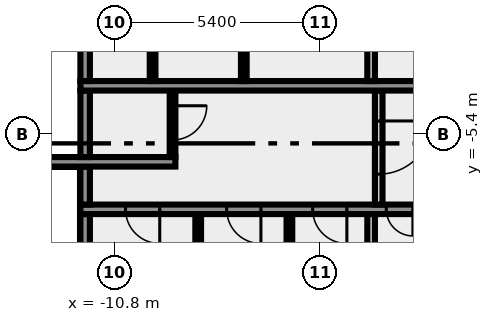
"""IFC4 building model, lengths in metres.
Left out: names, types, materials, properties, quantities, classifications, styles, units other than length and angle.
Written with IfcOpenShell. Run it as: python <this file> out.ifc"""

import sys

from ifc_helpers import new_model, si_unit, direction, frame, frame_2d, origin, place, context, subcontext, project, spatial, rectangle, extrude, element, fill, save


model = new_model("IFC4")
c1 = context("Model", 3, precision=1e-05, world=origin(), true_north=direction((0.0, 1.0)))
c2 = subcontext(c1, "Body", "Model", "MODEL_VIEW")
j1 = project(units=[si_unit("LENGTHUNIT", "METRE"), si_unit("PLANEANGLEUNIT", "RADIAN")], contexts=[c1])
p1 = place(None, origin())
s1 = spatial("IfcSite", under=j1, at=p1, CompositionType="ELEMENT")
p2 = place(p1, origin())
s2 = spatial("IfcBuilding", under=s1, at=p2, CompositionType="ELEMENT")
p3 = place(p2, frame((0.0, 0.0, 206.0)))
s3 = spatial("IfcBuildingStorey", under=s2, at=p3, CompositionType="ELEMENT", Elevation=206.0)
p4 = place(p3, frame((-11.575, -10.5, 0.0), z_axis=(0.0, 0.0, 1.0), x_axis=(0.0, 1.0, 0.0)))
e1 = element("IfcWall", 1, at=p4, inside=s3, PredefinedType="SHEAR", context=c2, shape_type="SweptSolid", body=[
    extrude(rectangle(XDim=3.0, YDim=0.25, at=frame_2d((1.5, 0.0))), origin(), (0.0, 0.0, 1.0), 3.65),
])
for number, where, z_axis, x_axis in (
    (2, (-8.6, -10.5, 0.0), (0.0, 0.0, 1.0), (0.0, 1.0, 0.0)),
    (3, (-6.2, -10.5, 0.0), (0.0, 0.0, 1.0), (0.0, 1.0, 0.0)),
):
    element("IfcWall", number, at=place(p3, frame(where, z_axis=z_axis, x_axis=x_axis)), inside=s3, PredefinedType="PARTITIONING", context=c2, shape_type="SweptSolid", body=[
        extrude(rectangle(XDim=3.0, YDim=0.15, at=frame_2d((1.5, 0.0))), origin(), (0.0, 0.0, 1.0), 3.65),
    ])
p5 = place(p3, frame((-4.05, -10.5, 0.0), z_axis=(0.0, 0.0, 1.0), x_axis=(0.0, 1.0, 0.0)))
e4 = element("IfcWall", 4, at=p5, inside=s3, PredefinedType="SOLIDWALL", context=c2, shape_type="SweptSolid", body=[
    extrude(rectangle(XDim=3.0, YDim=0.2, at=frame_2d((1.5, 0.0))), origin(), (0.0, 0.0, 1.0), 3.65),
])
p6 = place(p3, frame((11.7, -7.375, 0.0), z_axis=(0.0, 0.0, 1.0), x_axis=(-1.0, 0.0, 0.0)))
e5 = element("IfcWall", 5, at=p6, inside=s3, PredefinedType="SHEAR", context=c2, shape_type="SweptSolid", body=[
    extrude(rectangle(XDim=23.4, YDim=0.25, at=frame_2d((11.7, 0.0))), origin(), (0.0, 0.0, 1.0), 3.65),
])
p7 = place(p6, frame((21.312, 0.0, 0.0)))
e6 = element("IfcOpeningElement", 6, at=p7, cuts=e5, PredefinedType="OPENING", context=c2, shape_type="SweptSolid", body=[
    extrude(rectangle(XDim=0.9, YDim=2.1, at=frame_2d((0.45, 1.05))), frame((0.0, 0.135, 0.0), z_axis=(0.0, -1.0, 0.0), x_axis=(1.0, 0.0, 0.0)), (0.0, 0.0, 1.0), 0.27),
])
p8 = place(p6, frame((18.65, 0.0, 0.0)))
e7 = element("IfcOpeningElement", 7, at=p8, cuts=e5, PredefinedType="OPENING", context=c2, shape_type="SweptSolid", body=[
    extrude(rectangle(XDim=0.9, YDim=2.1, at=frame_2d((0.45, 1.05))), frame((0.0, 0.135, 0.0), z_axis=(0.0, -1.0, 0.0), x_axis=(1.0, 0.0, 0.0)), (0.0, 0.0, 1.0), 0.27),
])
p9 = place(p6, frame((16.388, 0.0, 0.0)))
e8 = element("IfcOpeningElement", 8, at=p9, cuts=e5, PredefinedType="OPENING", context=c2, shape_type="SweptSolid", body=[
    extrude(rectangle(XDim=0.9, YDim=2.1, at=frame_2d((0.45, 1.05))), frame((0.0, 0.135, 0.0), z_axis=(0.0, -1.0, 0.0), x_axis=(1.0, 0.0, 0.0)), (0.0, 0.0, 1.0), 0.27),
])
p10 = place(p6, frame((14.65, 0.0, 0.0)))
e9 = element("IfcOpeningElement", 9, at=p10, cuts=e5, PredefinedType="OPENING", context=c2, shape_type="SweptSolid", body=[
    extrude(rectangle(XDim=0.7, YDim=2.1, at=frame_2d((0.35, 1.05))), frame((0.0, 0.135, 0.0), z_axis=(0.0, -1.0, 0.0), x_axis=(1.0, 0.0, 0.0)), (0.0, 0.0, 1.0), 0.27),
])
p11 = place(p6, frame((13.35, 0.0, 0.0)))
e10 = element("IfcOpeningElement", 10, at=p11, cuts=e5, PredefinedType="OPENING", context=c2, shape_type="SweptSolid", body=[
    extrude(rectangle(XDim=0.9, YDim=2.1, at=frame_2d((0.45, 1.05))), frame((0.0, 0.135, 0.0), z_axis=(0.0, -1.0, 0.0), x_axis=(1.0, 0.0, 0.0)), (0.0, 0.0, 1.0), 0.27),
])
p12 = place(p6, frame((11.975, 0.0, 0.0)))
e11 = element("IfcOpeningElement", 11, at=p12, cuts=e5, PredefinedType="OPENING", context=c2, shape_type="SweptSolid", body=[
    extrude(rectangle(XDim=0.9, YDim=2.1, at=frame_2d((0.45, 1.05))), frame((0.0, 0.135, 0.0), z_axis=(0.0, -1.0, 0.0), x_axis=(1.0, 0.0, 0.0)), (0.0, 0.0, 1.0), 0.27),
])
p13 = place(p6, frame((10.5, 0.0, 0.0)))
e12 = element("IfcOpeningElement", 12, at=p13, cuts=e5, PredefinedType="OPENING", context=c2, shape_type="SweptSolid", body=[
    extrude(rectangle(XDim=0.9, YDim=2.1, at=frame_2d((0.45, 1.05))), frame((0.0, 0.135, 0.0), z_axis=(0.0, -1.0, 0.0), x_axis=(1.0, 0.0, 0.0)), (0.0, 0.0, 1.0), 0.27),
])
p14 = place(p6, frame((8.35, 0.0, 0.0)))
e13 = element("IfcOpeningElement", 13, at=p14, cuts=e5, PredefinedType="OPENING", context=c2, shape_type="SweptSolid", body=[
    extrude(rectangle(XDim=1.1, YDim=2.1, at=frame_2d((0.55, 1.05))), frame((0.0, 0.135, 0.0), z_axis=(0.0, -1.0, 0.0), x_axis=(1.0, 0.0, 0.0)), (0.0, 0.0, 1.0), 0.27),
])
p15 = place(p6, frame((5.85, 0.0, 0.0)))
e14 = element("IfcOpeningElement", 14, at=p15, cuts=e5, PredefinedType="OPENING", context=c2, shape_type="SweptSolid", body=[
    extrude(rectangle(XDim=1.1, YDim=2.1, at=frame_2d((0.55, 1.05))), frame((0.0, 0.135, 0.0), z_axis=(0.0, -1.0, 0.0), x_axis=(1.0, 0.0, 0.0)), (0.0, 0.0, 1.0), 0.27),
])
p16 = place(p6, frame((3.35, 0.0, 0.0)))
e15 = element("IfcOpeningElement", 15, at=p16, cuts=e5, PredefinedType="OPENING", context=c2, shape_type="SweptSolid", body=[
    extrude(rectangle(XDim=1.1, YDim=2.1, at=frame_2d((0.55, 1.05))), frame((0.0, 0.135, 0.0), z_axis=(0.0, -1.0, 0.0), x_axis=(1.0, 0.0, 0.0)), (0.0, 0.0, 1.0), 0.27),
])
p17 = place(p6, frame((0.85, 0.0, 0.0)))
e16 = element("IfcOpeningElement", 16, at=p17, cuts=e5, PredefinedType="OPENING", context=c2, shape_type="SweptSolid", body=[
    extrude(rectangle(XDim=1.1, YDim=2.1, at=frame_2d((0.55, 1.05))), frame((0.0, 0.135, 0.0), z_axis=(0.0, -1.0, 0.0), x_axis=(1.0, 0.0, 0.0)), (0.0, 0.0, 1.0), 0.27),
])
p18 = place(p3, frame((-11.575, -7.25, 0.0), z_axis=(0.0, 0.0, 1.0), x_axis=(0.0, 1.0, 0.0)))
e17 = element("IfcWall", 17, at=p18, inside=s3, PredefinedType="SHEAR", context=c2, shape_type="SweptSolid", body=[
    extrude(rectangle(XDim=1.0, YDim=0.25, at=frame_2d((0.5, 0.0))), origin(), (0.0, 0.0, 1.0), 3.65),
])
p19 = place(p3, frame((-3.85, -4.25, 0.0), z_axis=(0.0, 0.0, 1.0), x_axis=(0.0, -1.0, 0.0)))
e18 = element("IfcWall", 18, at=p19, inside=s3, PredefinedType="SOLIDWALL", context=c2, shape_type="SweptSolid", body=[
    extrude(rectangle(XDim=3.0, YDim=0.2, at=frame_2d((1.5, 0.0))), origin(), (0.0, 0.0, 1.0), 3.65),
])
p20 = place(p19, frame((0.8, 0.0, 0.0)))
e19 = element("IfcOpeningElement", 19, at=p20, cuts=e18, PredefinedType="OPENING", context=c2, shape_type="SweptSolid", body=[
    extrude(rectangle(XDim=1.4, YDim=2.1, at=frame_2d((0.7, 1.05))), frame((0.0, 0.11, 0.0), z_axis=(0.0, -1.0, 0.0), x_axis=(1.0, 0.0, 0.0)), (0.0, 0.0, 1.0), 0.22),
])
p21 = place(p3, frame((-9.2, -6.125, 0.0), z_axis=(0.0, 0.0, 1.0), x_axis=(-1.0, 0.0, 0.0)))
e20 = element("IfcWall", 20, at=p21, inside=s3, PredefinedType="SHEAR", context=c2, shape_type="SweptSolid", body=[
    extrude(rectangle(XDim=10.8, YDim=0.25, at=frame_2d((5.4, 0.0))), origin(), (0.0, 0.0, 1.0), 3.65),
])
p22 = place(p21, frame((8.45, 0.0, 0.0)))
e21 = element("IfcOpeningElement", 21, at=p22, cuts=e20, PredefinedType="OPENING", context=c2, shape_type="SweptSolid", body=[
    extrude(rectangle(XDim=1.8, YDim=2.1, at=frame_2d((0.9, 1.05))), frame((0.0, 0.135, 0.0), z_axis=(0.0, -1.0, 0.0), x_axis=(1.0, 0.0, 0.0)), (0.0, 0.0, 1.0), 0.27),
])
p23 = place(p3, frame((-11.575, -6.0, 0.0), z_axis=(0.0, 0.0, 1.0), x_axis=(0.0, 1.0, 0.0)))
e22 = element("IfcWall", 22, at=p23, inside=s3, PredefinedType="SHEAR", context=c2, shape_type="SweptSolid", body=[
    extrude(rectangle(XDim=1.75, YDim=0.25, at=frame_2d((0.875, 0.0))), origin(), (0.0, 0.0, 1.0), 3.65),
])
p24 = place(p3, frame((-9.275, -4.25, 0.0), z_axis=(0.0, 0.0, 1.0), x_axis=(0.0, -1.0, 0.0)))
e23 = element("IfcWall", 23, at=p24, inside=s3, PredefinedType="PARTITIONING", context=c2, shape_type="SweptSolid", body=[
    extrude(rectangle(XDim=1.75, YDim=0.15, at=frame_2d((0.875, 0.0))), origin(), (0.0, 0.0, 1.0), 3.65),
])
p25 = place(p24, frame((0.4, 0.0, 0.0)))
e24 = element("IfcOpeningElement", 24, at=p25, cuts=e23, PredefinedType="OPENING", context=c2, shape_type="SweptSolid", body=[
    extrude(rectangle(XDim=0.9, YDim=2.1, at=frame_2d((0.45, 1.05))), frame((0.0, 0.085, 0.0), z_axis=(0.0, -1.0, 0.0), x_axis=(1.0, 0.0, 0.0)), (0.0, 0.0, 1.0), 0.17),
])
p26 = place(p3, frame((-11.7, -4.125, 0.0), z_axis=(0.0, 0.0, 1.0), x_axis=(1.0, 0.0, 0.0)))
e25 = element("IfcWall", 25, at=p26, inside=s3, PredefinedType="SHEAR", context=c2, shape_type="SweptSolid", body=[
    extrude(rectangle(XDim=10.05, YDim=0.25, at=frame_2d((5.025, 0.0))), origin(), (0.0, 0.0, 1.0), 3.65),
])
p27 = place(p3, frame((-11.575, -4.0, 0.0), z_axis=(0.0, 0.0, 1.0), x_axis=(0.0, 1.0, 0.0)))
e26 = element("IfcWall", 26, at=p27, inside=s3, PredefinedType="SHEAR", context=c2, shape_type="SweptSolid", body=[
    extrude(rectangle(XDim=2.3, YDim=0.25, at=frame_2d((1.15, 0.0))), origin(), (0.0, 0.0, 1.0), 3.65),
])
for number, where, z_axis, x_axis in (
    (27, (-9.8, -4.0, 0.0), (0.0, 0.0, 1.0), (0.0, 1.0, 0.0)),
    (28, (-7.4, -4.0, 0.0), (0.0, 0.0, 1.0), (0.0, 1.0, 0.0)),
):
    element("IfcWall", number, at=place(p3, frame(where, z_axis=z_axis, x_axis=x_axis)), inside=s3, PredefinedType="PARTITIONING", context=c2, shape_type="SweptSolid", body=[
        extrude(rectangle(XDim=2.3, YDim=0.15, at=frame_2d((1.15, 0.0))), origin(), (0.0, 0.0, 1.0), 3.65),
    ])
p28 = place(p3, frame((-4.05, -4.0, 0.0), z_axis=(0.0, 0.0, 1.0), x_axis=(0.0, 1.0, 0.0)))
e29 = element("IfcWall", 29, at=p28, inside=s3, PredefinedType="SOLIDWALL", context=c2, shape_type="SweptSolid", body=[
    extrude(rectangle(XDim=2.3, YDim=0.2, at=frame_2d((1.15, 0.0))), origin(), (0.0, 0.0, 1.0), 3.65),
])
p29 = place(p7, origin())
e30 = element("IfcDoor", 30, at=p29, inside=s3, OperationType="SINGLE_SWING_RIGHT", PredefinedType="DOOR", context=c2, shape_type="SweptSolid", body=[
    extrude(rectangle(XDim=0.9, YDim=2.1, at=frame_2d((0.45, 1.05))), frame((0.0, 0.025, 0.0), z_axis=(0.0, -1.0, 0.0), x_axis=(1.0, 0.0, 0.0)), (0.0, 0.0, 1.0), 0.05),
])
fill(e6, e30)
p30 = place(p8, origin())
e31 = element("IfcDoor", 31, at=p30, inside=s3, OperationType="SINGLE_SWING_RIGHT", PredefinedType="DOOR", context=c2, shape_type="SweptSolid", body=[
    extrude(rectangle(XDim=0.9, YDim=2.1, at=frame_2d((0.45, 1.05))), frame((0.0, 0.025, 0.0), z_axis=(0.0, -1.0, 0.0), x_axis=(1.0, 0.0, 0.0)), (0.0, 0.0, 1.0), 0.05),
])
fill(e7, e31)
p31 = place(p9, origin())
e32 = element("IfcDoor", 32, at=p31, inside=s3, OperationType="SINGLE_SWING_RIGHT", PredefinedType="DOOR", context=c2, shape_type="SweptSolid", body=[
    extrude(rectangle(XDim=0.9, YDim=2.1, at=frame_2d((0.45, 1.05))), frame((0.0, 0.025, 0.0), z_axis=(0.0, -1.0, 0.0), x_axis=(1.0, 0.0, 0.0)), (0.0, 0.0, 1.0), 0.05),
])
fill(e8, e32)
p32 = place(p10, origin())
e33 = element("IfcDoor", 33, at=p32, inside=s3, OperationType="SINGLE_SWING_RIGHT", PredefinedType="DOOR", context=c2, shape_type="SweptSolid", body=[
    extrude(rectangle(XDim=0.7, YDim=2.1, at=frame_2d((0.35, 1.05))), frame((0.0, 0.025, 0.0), z_axis=(0.0, -1.0, 0.0), x_axis=(1.0, 0.0, 0.0)), (0.0, 0.0, 1.0), 0.05),
])
fill(e9, e33)
p33 = place(p20, origin())
e34 = element("IfcDoor", 34, at=p33, inside=s3, OperationType="DOUBLE_DOOR_SINGLE_SWING", PredefinedType="DOOR", context=c2, shape_type="SweptSolid", body=[
    extrude(rectangle(XDim=1.4, YDim=2.1, at=frame_2d((0.7, 1.05))), frame((0.0, 0.025, 0.0), z_axis=(0.0, -1.0, 0.0), x_axis=(1.0, 0.0, 0.0)), (0.0, 0.0, 1.0), 0.05),
])
fill(e19, e34)
p34 = place(p25, origin())
e35 = element("IfcDoor", 35, at=p34, inside=s3, OperationType="SINGLE_SWING_LEFT", PredefinedType="DOOR", context=c2, shape_type="SweptSolid", body=[
    extrude(rectangle(XDim=0.9, YDim=2.1, at=frame_2d((0.45, 1.05))), frame((0.0, 0.025, 0.0), z_axis=(0.0, -1.0, 0.0), x_axis=(1.0, 0.0, 0.0)), (0.0, 0.0, 1.0), 0.05),
])
fill(e24, e35)
save(model, sys.argv[1])
